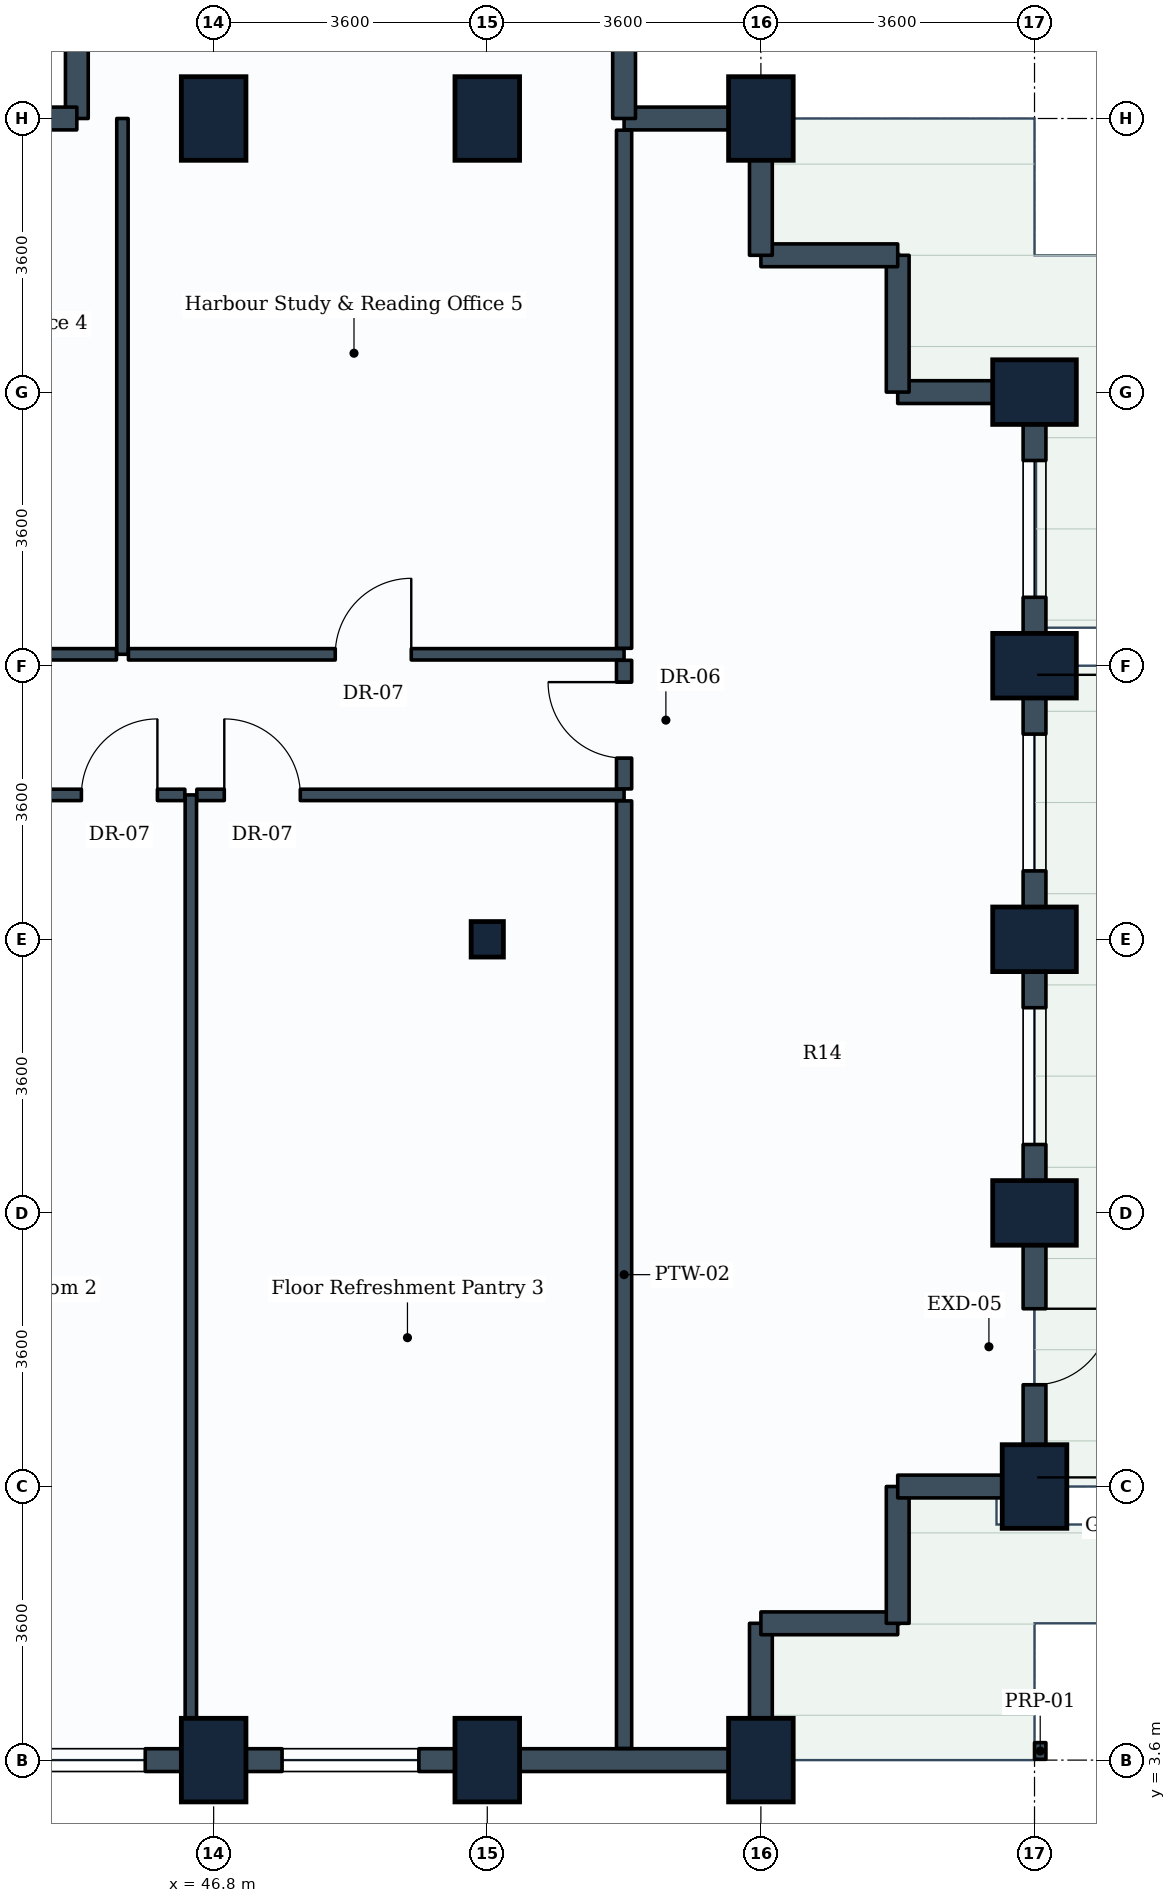
"""IFC4 building model, lengths in metres.
Left out: names, types, materials, properties, quantities, classifications, styles, units other than length and angle.
Written with IfcOpenShell. Run it as: python <this file> out.ifc"""

import sys

from ifc_helpers import new_model, si_unit, direction, frame, frame_2d, origin, origin_2d, place, context, subcontext, project, spatial, rectangle, i_section, extrude, element, fill, save


model = new_model("IFC4")
c1 = context("Model", 3, precision=1e-05, world=origin(), true_north=direction((0.0, 1.0)))
c2 = subcontext(c1, "Body", "Model", "MODEL_VIEW")
j1 = project(units=[si_unit("LENGTHUNIT", "METRE"), si_unit("PLANEANGLEUNIT", "RADIAN")], contexts=[c1])
p1 = place(None, origin())
s1 = spatial("IfcSite", under=j1, at=p1, CompositionType="ELEMENT")
p2 = place(p1, origin())
s2 = spatial("IfcBuilding", under=s1, at=p2, CompositionType="ELEMENT")
p3 = place(p2, frame((0.0, 0.0, 80.1)))
s3 = spatial("IfcBuildingStorey", under=s2, at=p3, CompositionType="ELEMENT", Elevation=80.1)
for number, where, z_axis, x_axis in (
    (1, (46.8, 3.6, 0.0), (0.0, 0.0, 1.0), (1.0, 0.0, 0.0)),
    (2, (46.8, 25.2, 0.0), (0.0, 0.0, 1.0), (1.0, 0.0, 0.0)),
    (3, (50.4, 3.6, 0.0), (0.0, 0.0, 1.0), (1.0, 0.0, 0.0)),
):
    element("IfcColumn", number, at=place(p3, frame(where, z_axis=z_axis, x_axis=x_axis)), inside=s3, PredefinedType="COLUMN", context=c2, shape_type="SweptSolid", body=[
        extrude(rectangle(XDim=0.85, YDim=1.1, at=origin_2d()), origin(), (0.0, 0.0, 1.0), 3.9),
    ])
p4 = place(p3, frame((50.4, 14.4, 0.0), z_axis=(0.0, 0.0, 1.0), x_axis=(1.0, 0.0, 0.0)))
e4 = element("IfcColumn", 4, at=p4, inside=s3, PredefinedType="COLUMN", context=c2, shape_type="SweptSolid", body=[
    extrude(i_section(OverallWidth=0.424, OverallDepth=0.467, WebThickness=0.033, FlangeThickness=0.053, FilletRadius=0.015, at=origin_2d()), origin(), (0.0, 0.0, 1.0), 3.9),
])
for number, where, z_axis, x_axis in (
    (5, (50.4, 25.2, 0.0), (0.0, 0.0, 1.0), (1.0, 0.0, 0.0)),
    (6, (54.0, 3.6, 0.0), (0.0, 0.0, 1.0), (1.0, 0.0, 0.0)),
    (7, (54.0, 25.2, 0.0), (0.0, 0.0, 1.0), (1.0, 0.0, 0.0)),
    (8, (57.6, 7.2, 0.0), (0.0, 0.0, 1.0), (1.0, 0.0, 0.0)),
    (9, (57.6, 10.8, 0.0), (0.0, 0.0, 1.0), (0.0, 1.0, 0.0)),
    (10, (57.6, 14.4, 0.0), (0.0, 0.0, 1.0), (0.0, 1.0, 0.0)),
    (11, (57.6, 18.0, 0.0), (0.0, 0.0, 1.0), (0.0, 1.0, 0.0)),
    (12, (57.6, 21.6, 0.0), (0.0, 0.0, 1.0), (0.0, 1.0, 0.0)),
):
    element("IfcColumn", number, at=place(p3, frame(where, z_axis=z_axis, x_axis=x_axis)), inside=s3, PredefinedType="COLUMN", context=c2, shape_type="SweptSolid", body=[
        extrude(rectangle(XDim=0.85, YDim=1.1, at=origin_2d()), origin(), (0.0, 0.0, 1.0), 3.9),
    ])
p5 = place(p3, frame((57.75, 3.72, 0.0), z_axis=(0.0, 0.0, 1.0), x_axis=(-1.0, 0.0, 0.0)))
e13 = element("IfcWall", 13, at=p5, inside=s3, PredefinedType="PARAPET", context=c2, shape_type="SweptSolid", body=[
    extrude(rectangle(XDim=0.15, YDim=0.22, at=frame_2d((0.075, 0.0))), origin(), (0.0, 0.0, 1.0), 1.15),
])
p6 = place(p3, frame((46.8, 3.6, 0.0), z_axis=(0.0, 0.0, 1.0), x_axis=(-1.0, 0.0, 0.0)))
e14 = element("IfcWall", 14, at=p6, inside=s3, PredefinedType="STANDARD", context=c2, shape_type="SweptSolid", body=[
    extrude(rectangle(XDim=3.6, YDim=0.3, at=frame_2d((1.8, 0.0))), origin(), (0.0, 0.0, 1.0), 2.93),
])
p7 = place(p6, frame((0.9, 0.0, 0.85)))
e15 = element("IfcOpeningElement", 15, at=p7, cuts=e14, PredefinedType="OPENING", context=c2, shape_type="SweptSolid", body=[
    extrude(rectangle(XDim=1.8, YDim=1.35, at=frame_2d((0.9, 0.675))), frame((0.0, 0.16, 0.0), z_axis=(0.0, -1.0, 0.0), x_axis=(1.0, 0.0, 0.0)), (0.0, 0.0, 1.0), 0.32),
])
p8 = place(p3, frame((50.4, 3.6, 0.0), z_axis=(0.0, 0.0, 1.0), x_axis=(-1.0, 0.0, 0.0)))
e16 = element("IfcWall", 16, at=p8, inside=s3, PredefinedType="STANDARD", context=c2, shape_type="SweptSolid", body=[
    extrude(rectangle(XDim=3.6, YDim=0.3, at=frame_2d((1.8, 0.0))), origin(), (0.0, 0.0, 1.0), 2.93),
])
p9 = place(p8, frame((0.9, 0.0, 0.85)))
e17 = element("IfcOpeningElement", 17, at=p9, cuts=e16, PredefinedType="OPENING", context=c2, shape_type="SweptSolid", body=[
    extrude(rectangle(XDim=1.8, YDim=1.35, at=frame_2d((0.9, 0.675))), frame((0.0, 0.16, 0.0), z_axis=(0.0, -1.0, 0.0), x_axis=(1.0, 0.0, 0.0)), (0.0, 0.0, 1.0), 0.32),
])
p10 = place(p3, frame((54.0, 3.6, 0.0), z_axis=(0.0, 0.0, 1.0), x_axis=(-1.0, 0.0, 0.0)))
e18 = element("IfcWall", 18, at=p10, inside=s3, PredefinedType="STANDARD", context=c2, shape_type="SweptSolid", body=[
    extrude(rectangle(XDim=3.6, YDim=0.3, at=frame_2d((1.8, 0.0))), origin(), (0.0, 0.0, 1.0), 2.93),
])
p11 = place(p3, frame((54.0, 5.4, 0.0), z_axis=(0.0, 0.0, 1.0), x_axis=(0.0, -1.0, 0.0)))
e19 = element("IfcWall", 19, at=p11, inside=s3, PredefinedType="STANDARD", context=c2, shape_type="SweptSolid", body=[
    extrude(rectangle(XDim=1.8, YDim=0.3, at=frame_2d((0.9, 0.0))), origin(), (0.0, 0.0, 1.0), 2.93),
])
for number, where, z_axis, x_axis in (
    (20, (55.8, 5.4, 0.0), (0.0, 0.0, 1.0), (-1.0, 0.0, 0.0)),
    (21, (55.8, 7.2, 0.0), (0.0, 0.0, 1.0), (0.0, -1.0, 0.0)),
):
    element("IfcWall", number, at=place(p3, frame(where, z_axis=z_axis, x_axis=x_axis)), inside=s3, PredefinedType="STANDARD", context=c2, shape_type="SweptSolid", body=[
        extrude(rectangle(XDim=1.8, YDim=0.3, at=frame_2d((0.9, 0.0))), origin(), (0.0, 0.0, 1.0), 3.635),
    ])
p12 = place(p3, frame((57.6, 7.2, 0.0), z_axis=(0.0, 0.0, 1.0), x_axis=(-1.0, 0.0, 0.0)))
e22 = element("IfcWall", 22, at=p12, inside=s3, PredefinedType="STANDARD", context=c2, shape_type="SweptSolid", body=[
    extrude(rectangle(XDim=1.8, YDim=0.3, at=frame_2d((0.9, 0.0))), origin(), (0.0, 0.0, 1.0), 2.93),
])
p13 = place(p3, frame((57.6, 10.8, 0.0), z_axis=(0.0, 0.0, 1.0), x_axis=(0.0, -1.0, 0.0)))
e23 = element("IfcWall", 23, at=p13, inside=s3, PredefinedType="STANDARD", context=c2, shape_type="SweptSolid", body=[
    extrude(rectangle(XDim=3.6, YDim=0.3, at=frame_2d((1.8, 0.0))), origin(), (0.0, 0.0, 1.0), 2.93),
])
p14 = place(p13, frame((1.261, 0.0, 0.0)))
e24 = element("IfcOpeningElement", 24, at=p14, cuts=e23, PredefinedType="OPENING", context=c2, shape_type="SweptSolid", body=[
    extrude(rectangle(XDim=1.0, YDim=2.1, at=frame_2d((0.5, 1.05))), frame((0.0, 0.16, 0.0), z_axis=(0.0, -1.0, 0.0), x_axis=(1.0, 0.0, 0.0)), (0.0, 0.0, 1.0), 0.32),
])
p15 = place(p3, frame((57.6, 14.4, 0.0), z_axis=(0.0, 0.0, 1.0), x_axis=(0.0, -1.0, 0.0)))
e25 = element("IfcWall", 25, at=p15, inside=s3, PredefinedType="STANDARD", context=c2, shape_type="SweptSolid", body=[
    extrude(rectangle(XDim=3.6, YDim=0.3, at=frame_2d((1.8, 0.0))), origin(), (0.0, 0.0, 1.0), 2.93),
])
p16 = place(p15, frame((0.9, 0.0, 0.85)))
e26 = element("IfcOpeningElement", 26, at=p16, cuts=e25, PredefinedType="OPENING", context=c2, shape_type="SweptSolid", body=[
    extrude(rectangle(XDim=1.8, YDim=1.35, at=frame_2d((0.9, 0.675))), frame((0.0, 0.16, 0.0), z_axis=(0.0, -1.0, 0.0), x_axis=(1.0, 0.0, 0.0)), (0.0, 0.0, 1.0), 0.32),
])
p17 = place(p3, frame((57.6, 18.0, 0.0), z_axis=(0.0, 0.0, 1.0), x_axis=(0.0, -1.0, 0.0)))
e27 = element("IfcWall", 27, at=p17, inside=s3, PredefinedType="STANDARD", context=c2, shape_type="SweptSolid", body=[
    extrude(rectangle(XDim=3.6, YDim=0.3, at=frame_2d((1.8, 0.0))), origin(), (0.0, 0.0, 1.0), 2.93),
])
p18 = place(p17, frame((0.9, 0.0, 0.85)))
e28 = element("IfcOpeningElement", 28, at=p18, cuts=e27, PredefinedType="OPENING", context=c2, shape_type="SweptSolid", body=[
    extrude(rectangle(XDim=1.8, YDim=1.35, at=frame_2d((0.9, 0.675))), frame((0.0, 0.16, 0.0), z_axis=(0.0, -1.0, 0.0), x_axis=(1.0, 0.0, 0.0)), (0.0, 0.0, 1.0), 0.32),
])
p19 = place(p3, frame((57.6, 21.6, 0.0), z_axis=(0.0, 0.0, 1.0), x_axis=(0.0, -1.0, 0.0)))
e29 = element("IfcWall", 29, at=p19, inside=s3, PredefinedType="STANDARD", context=c2, shape_type="SweptSolid", body=[
    extrude(rectangle(XDim=3.6, YDim=0.3, at=frame_2d((1.8, 0.0))), origin(), (0.0, 0.0, 1.0), 2.93),
])
p20 = place(p19, frame((0.9, 0.0, 0.85)))
e30 = element("IfcOpeningElement", 30, at=p20, cuts=e29, PredefinedType="OPENING", context=c2, shape_type="SweptSolid", body=[
    extrude(rectangle(XDim=1.8, YDim=1.35, at=frame_2d((0.9, 0.675))), frame((0.0, 0.16, 0.0), z_axis=(0.0, -1.0, 0.0), x_axis=(1.0, 0.0, 0.0)), (0.0, 0.0, 1.0), 0.32),
])
p21 = place(p3, frame((55.8, 21.6, 0.0), z_axis=(0.0, 0.0, 1.0), x_axis=(1.0, 0.0, 0.0)))
e31 = element("IfcWall", 31, at=p21, inside=s3, PredefinedType="STANDARD", context=c2, shape_type="SweptSolid", body=[
    extrude(rectangle(XDim=1.8, YDim=0.3, at=frame_2d((0.9, 0.0))), origin(), (0.0, 0.0, 1.0), 2.93),
])
p22 = place(p3, frame((55.8, 23.4, 0.0), z_axis=(0.0, 0.0, 1.0), x_axis=(0.0, -1.0, 0.0)))
e32 = element("IfcWall", 32, at=p22, inside=s3, PredefinedType="STANDARD", context=c2, shape_type="SweptSolid", body=[
    extrude(rectangle(XDim=1.8, YDim=0.3, at=frame_2d((0.9, 0.0))), origin(), (0.0, 0.0, 1.0), 3.635),
])
p23 = place(p3, frame((54.0, 23.4, 0.0), z_axis=(0.0, 0.0, 1.0), x_axis=(1.0, 0.0, 0.0)))
e33 = element("IfcWall", 33, at=p23, inside=s3, PredefinedType="STANDARD", context=c2, shape_type="SweptSolid", body=[
    extrude(rectangle(XDim=1.8, YDim=0.3, at=frame_2d((0.9, 0.0))), origin(), (0.0, 0.0, 1.0), 3.635),
])
for number, where, z_axis, x_axis in (
    (34, (54.0, 25.2, 0.0), (0.0, 0.0, 1.0), (0.0, -1.0, 0.0)),
    (35, (52.2, 25.2, 0.0), (0.0, 0.0, 1.0), (1.0, 0.0, 0.0)),
):
    element("IfcWall", number, at=place(p3, frame(where, z_axis=z_axis, x_axis=x_axis)), inside=s3, PredefinedType="STANDARD", context=c2, shape_type="SweptSolid", body=[
        extrude(rectangle(XDim=1.8, YDim=0.3, at=frame_2d((0.9, 0.0))), origin(), (0.0, 0.0, 1.0), 2.93),
    ])
for number, where, z_axis, x_axis in (
    (36, (52.2, 27.3, 0.0), (0.0, 0.0, 1.0), (0.0, -1.0, 0.0)),
    (37, (45.0, 27.3, 0.0), (0.0, 0.0, 1.0), (0.0, -1.0, 0.0)),
):
    element("IfcWall", number, at=place(p3, frame(where, z_axis=z_axis, x_axis=x_axis)), inside=s3, PredefinedType="STANDARD", context=c2, shape_type="SweptSolid", body=[
        extrude(rectangle(XDim=2.1, YDim=0.3, at=frame_2d((1.05, 0.0))), origin(), (0.0, 0.0, 1.0), 2.93),
    ])
p24 = place(p3, frame((43.2, 25.2, 0.0), z_axis=(0.0, 0.0, 1.0), x_axis=(1.0, 0.0, 0.0)))
e38 = element("IfcWall", 38, at=p24, inside=s3, PredefinedType="STANDARD", context=c2, shape_type="SweptSolid", body=[
    extrude(rectangle(XDim=1.8, YDim=0.3, at=frame_2d((0.9, 0.0))), origin(), (0.0, 0.0, 1.0), 2.93),
])
p25 = place(p3, frame((46.5, 3.754, 0.0), z_axis=(0.0, 0.0, 1.0), x_axis=(0.0, 1.0, 0.0)))
e39 = element("IfcWall", 39, at=p25, inside=s3, PredefinedType="PARTITIONING", context=c2, shape_type="SweptSolid", body=[
    extrude(rectangle(XDim=12.546, YDim=0.15, at=frame_2d((6.273, 0.0))), origin(), (0.0, 0.0, 1.0), 2.93),
])
p26 = place(p3, frame((40.709, 16.3, 0.0), z_axis=(0.0, 0.0, 1.0), x_axis=(1.0, 0.0, 0.0)))
e40 = element("IfcWall", 40, at=p26, inside=s3, PredefinedType="PARTITIONING", context=c2, shape_type="SweptSolid", body=[
    extrude(rectangle(XDim=5.712, YDim=0.15, at=frame_2d((2.856, 0.0))), origin(), (0.0, 0.0, 1.0), 3.24),
])
p27 = place(p26, frame((4.351, 0.0, 0.0)))
e41 = element("IfcOpeningElement", 41, at=p27, cuts=e40, PredefinedType="OPENING", context=c2, shape_type="SweptSolid", body=[
    extrude(rectangle(XDim=1.0, YDim=2.1, at=frame_2d((0.5, 1.05))), frame((0.0, 0.085, 0.0), z_axis=(0.0, -1.0, 0.0), x_axis=(1.0, 0.0, 0.0)), (0.0, 0.0, 1.0), 0.17),
])
p28 = place(p3, frame((46.579, 16.3, 0.0), z_axis=(0.0, 0.0, 1.0), x_axis=(1.0, 0.0, 0.0)))
e42 = element("IfcWall", 42, at=p28, inside=s3, PredefinedType="PARTITIONING", context=c2, shape_type="SweptSolid", body=[
    extrude(rectangle(XDim=5.621, YDim=0.15, at=frame_2d((2.811, 0.0))), origin(), (0.0, 0.0, 1.0), 3.19),
])
p29 = place(p28, frame((0.361, 0.0, 0.0)))
e43 = element("IfcOpeningElement", 43, at=p29, cuts=e42, PredefinedType="OPENING", context=c2, shape_type="SweptSolid", body=[
    extrude(rectangle(XDim=1.0, YDim=2.1, at=frame_2d((0.5, 1.05))), frame((0.0, 0.085, 0.0), z_axis=(0.0, -1.0, 0.0), x_axis=(1.0, 0.0, 0.0)), (0.0, 0.0, 1.0), 0.17),
])
p30 = place(p3, frame((45.6, 18.15, 0.0), z_axis=(0.0, 0.0, 1.0), x_axis=(0.0, 1.0, 0.0)))
e44 = element("IfcWall", 44, at=p30, inside=s3, PredefinedType="PARTITIONING", context=c2, shape_type="SweptSolid", body=[
    extrude(rectangle(XDim=7.05, YDim=0.15, at=frame_2d((3.525, 0.0))), origin(), (0.0, 0.0, 1.0), 2.93),
])
p31 = place(p3, frame((39.0, 18.15, 0.0), z_axis=(0.0, 0.0, 1.0), x_axis=(1.0, 0.0, 0.0)))
e45 = element("IfcWall", 45, at=p31, inside=s3, PredefinedType="PARTITIONING", context=c2, shape_type="SweptSolid", body=[
    extrude(rectangle(XDim=6.521, YDim=0.15, at=frame_2d((3.26, 0.0))), origin(), (0.0, 0.0, 1.0), 3.18),
])
p32 = place(p31, frame((2.8, 0.0, 0.0)))
e46 = element("IfcOpeningElement", 46, at=p32, cuts=e45, PredefinedType="OPENING", context=c2, shape_type="SweptSolid", body=[
    extrude(rectangle(XDim=1.0, YDim=2.1, at=frame_2d((0.5, 1.05))), frame((0.0, 0.085, 0.0), z_axis=(0.0, -1.0, 0.0), x_axis=(1.0, 0.0, 0.0)), (0.0, 0.0, 1.0), 0.17),
])
p33 = place(p3, frame((45.679, 18.15, 0.0), z_axis=(0.0, 0.0, 1.0), x_axis=(1.0, 0.0, 0.0)))
e47 = element("IfcWall", 47, at=p33, inside=s3, PredefinedType="PARTITIONING", context=c2, shape_type="SweptSolid", body=[
    extrude(rectangle(XDim=6.521, YDim=0.15, at=frame_2d((3.26, 0.0))), origin(), (0.0, 0.0, 1.0), 3.19),
])
p34 = place(p33, frame((2.721, 0.0, 0.0)))
e48 = element("IfcOpeningElement", 48, at=p34, cuts=e47, PredefinedType="OPENING", context=c2, shape_type="SweptSolid", body=[
    extrude(rectangle(XDim=1.0, YDim=2.1, at=frame_2d((0.5, 1.05))), frame((0.0, 0.085, 0.0), z_axis=(0.0, -1.0, 0.0), x_axis=(1.0, 0.0, 0.0)), (0.0, 0.0, 1.0), 0.17),
])
p35 = place(p3, frame((52.2, 3.754, 0.0), z_axis=(0.0, 0.0, 1.0), x_axis=(0.0, 1.0, 0.0)))
e49 = element("IfcWall", 49, at=p35, inside=s3, PredefinedType="PARTITIONING", context=c2, shape_type="SweptSolid", body=[
    extrude(rectangle(XDim=12.467, YDim=0.2, at=frame_2d((6.233, 0.0))), origin(), (0.0, 0.0, 1.0), 2.93),
])
p36 = place(p3, frame((52.2, 18.229, 0.0), z_axis=(0.0, 0.0, 1.0), x_axis=(0.0, 1.0, 0.0)))
e50 = element("IfcWall", 50, at=p36, inside=s3, PredefinedType="PARTITIONING", context=c2, shape_type="SweptSolid", body=[
    extrude(rectangle(XDim=6.817, YDim=0.2, at=frame_2d((3.408, 0.0))), origin(), (0.0, 0.0, 1.0), 2.93),
])
p37 = place(p3, frame((52.2, 16.379, 0.0), z_axis=(0.0, 0.0, 1.0), x_axis=(0.0, 1.0, 0.0)))
e51 = element("IfcWall", 51, at=p37, inside=s3, PredefinedType="PARTITIONING", context=c2, shape_type="SweptSolid", body=[
    extrude(rectangle(XDim=1.692, YDim=0.2, at=frame_2d((0.846, 0.0))), origin(), (0.0, 0.0, 1.0), 3.635),
])
p38 = place(p37, frame((0.405, 0.0, 0.0)))
e52 = element("IfcOpeningElement", 52, at=p38, cuts=e51, PredefinedType="OPENING", context=c2, shape_type="SweptSolid", body=[
    extrude(rectangle(XDim=1.0, YDim=2.1, at=frame_2d((0.5, 1.05))), frame((0.0, 0.11, 0.0), z_axis=(0.0, -1.0, 0.0), x_axis=(1.0, 0.0, 0.0)), (0.0, 0.0, 1.0), 0.22),
])
p39 = place(p7, origin())
e53 = element("IfcWindow", 53, at=p39, inside=s3, PartitioningType="SINGLE_PANEL", PredefinedType="WINDOW", context=c2, shape_type="SweptSolid", body=[
    extrude(rectangle(XDim=1.8, YDim=1.35, at=frame_2d((0.9, 0.675))), frame((0.0, 0.03, 0.0), z_axis=(0.0, -1.0, 0.0), x_axis=(1.0, 0.0, 0.0)), (0.0, 0.0, 1.0), 0.06),
])
fill(e15, e53)
p40 = place(p9, origin())
e54 = element("IfcWindow", 54, at=p40, inside=s3, PartitioningType="SINGLE_PANEL", PredefinedType="WINDOW", context=c2, shape_type="SweptSolid", body=[
    extrude(rectangle(XDim=1.8, YDim=1.35, at=frame_2d((0.9, 0.675))), frame((0.0, 0.03, 0.0), z_axis=(0.0, -1.0, 0.0), x_axis=(1.0, 0.0, 0.0)), (0.0, 0.0, 1.0), 0.06),
])
fill(e17, e54)
p41 = place(p14, origin())
e55 = element("IfcDoor", 55, at=p41, inside=s3, OperationType="SINGLE_SWING_LEFT", PredefinedType="DOOR", context=c2, shape_type="SweptSolid", body=[
    extrude(rectangle(XDim=1.0, YDim=2.1, at=frame_2d((0.5, 1.05))), frame((0.0, 0.025, 0.0), z_axis=(0.0, -1.0, 0.0), x_axis=(1.0, 0.0, 0.0)), (0.0, 0.0, 1.0), 0.05),
])
fill(e24, e55)
p42 = place(p16, origin())
e56 = element("IfcWindow", 56, at=p42, inside=s3, PartitioningType="SINGLE_PANEL", PredefinedType="WINDOW", context=c2, shape_type="SweptSolid", body=[
    extrude(rectangle(XDim=1.8, YDim=1.35, at=frame_2d((0.9, 0.675))), frame((0.0, 0.03, 0.0), z_axis=(0.0, -1.0, 0.0), x_axis=(1.0, 0.0, 0.0)), (0.0, 0.0, 1.0), 0.06),
])
fill(e26, e56)
p43 = place(p18, origin())
e57 = element("IfcWindow", 57, at=p43, inside=s3, PartitioningType="SINGLE_PANEL", PredefinedType="WINDOW", context=c2, shape_type="SweptSolid", body=[
    extrude(rectangle(XDim=1.8, YDim=1.35, at=frame_2d((0.9, 0.675))), frame((0.0, 0.03, 0.0), z_axis=(0.0, -1.0, 0.0), x_axis=(1.0, 0.0, 0.0)), (0.0, 0.0, 1.0), 0.06),
])
fill(e28, e57)
p44 = place(p20, origin())
e58 = element("IfcWindow", 58, at=p44, inside=s3, PartitioningType="SINGLE_PANEL", PredefinedType="WINDOW", context=c2, shape_type="SweptSolid", body=[
    extrude(rectangle(XDim=1.8, YDim=1.35, at=frame_2d((0.9, 0.675))), frame((0.0, 0.03, 0.0), z_axis=(0.0, -1.0, 0.0), x_axis=(1.0, 0.0, 0.0)), (0.0, 0.0, 1.0), 0.06),
])
fill(e30, e58)
p45 = place(p27, origin())
e59 = element("IfcDoor", 59, at=p45, inside=s3, OperationType="SINGLE_SWING_RIGHT", PredefinedType="DOOR", context=c2, shape_type="SweptSolid", body=[
    extrude(rectangle(XDim=1.0, YDim=2.1, at=frame_2d((0.5, 1.05))), frame((0.0, 0.025, 0.0), z_axis=(0.0, -1.0, 0.0), x_axis=(1.0, 0.0, 0.0)), (0.0, 0.0, 1.0), 0.05),
])
fill(e41, e59)
p46 = place(p29, origin())
e60 = element("IfcDoor", 60, at=p46, inside=s3, OperationType="SINGLE_SWING_LEFT", PredefinedType="DOOR", context=c2, shape_type="SweptSolid", body=[
    extrude(rectangle(XDim=1.0, YDim=2.1, at=frame_2d((0.5, 1.05))), frame((0.0, 0.025, 0.0), z_axis=(0.0, -1.0, 0.0), x_axis=(1.0, 0.0, 0.0)), (0.0, 0.0, 1.0), 0.05),
])
fill(e43, e60)
p47 = place(p34, origin())
e61 = element("IfcDoor", 61, at=p47, inside=s3, OperationType="SINGLE_SWING_RIGHT", PredefinedType="DOOR", context=c2, shape_type="SweptSolid", body=[
    extrude(rectangle(XDim=1.0, YDim=2.1, at=frame_2d((0.5, 1.05))), frame((0.0, 0.025, 0.0), z_axis=(0.0, -1.0, 0.0), x_axis=(1.0, 0.0, 0.0)), (0.0, 0.0, 1.0), 0.05),
])
fill(e48, e61)
p48 = place(p38, origin())
e62 = element("IfcDoor", 62, at=p48, inside=s3, OperationType="SINGLE_SWING_RIGHT", PredefinedType="DOOR", context=c2, shape_type="SweptSolid", body=[
    extrude(rectangle(XDim=1.0, YDim=2.1, at=frame_2d((0.5, 1.05))), frame((0.0, 0.025, 0.0), z_axis=(0.0, -1.0, 0.0), x_axis=(1.0, 0.0, 0.0)), (0.0, 0.0, 1.0), 0.05),
])
fill(e52, e62)
save(model, sys.argv[1])
